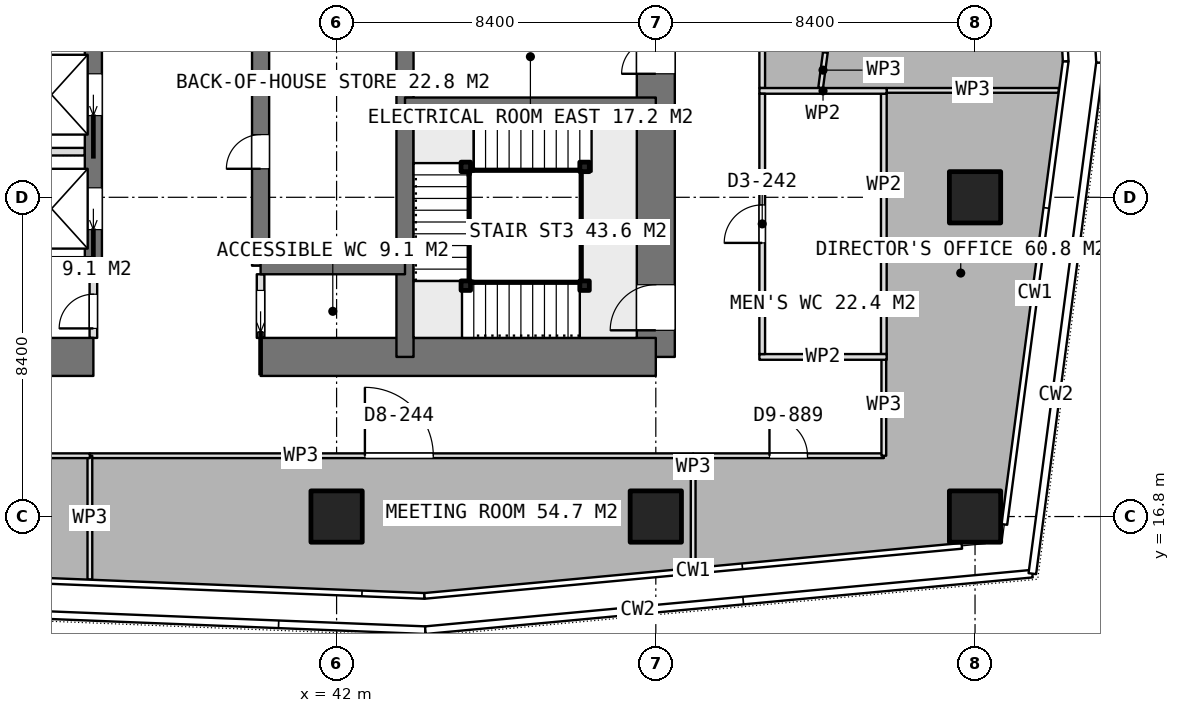
"""IFC4 building model, lengths in metres.
Left out: names, types, materials, properties, quantities, classifications, styles, units other than length and angle.
Written with IfcOpenShell. Run it as: python <this file> out.ifc"""

import sys

from ifc_helpers import new_model, si_unit, direction, frame, frame_2d, origin, origin_2d, place, context, subcontext, project, spatial, rectangle, extrude, element, fill, save


model = new_model("IFC4")
c1 = context("Model", 3, precision=1e-05, world=origin(), true_north=direction((0.0, 1.0)))
c2 = subcontext(c1, "Body", "Model", "MODEL_VIEW")
j1 = project(units=[si_unit("LENGTHUNIT", "METRE"), si_unit("PLANEANGLEUNIT", "RADIAN")], contexts=[c1])
p1 = place(None, origin())
s1 = spatial("IfcSite", under=j1, at=p1, CompositionType="ELEMENT")
p2 = place(p1, origin())
s2 = spatial("IfcBuilding", under=s1, at=p2, CompositionType="ELEMENT")
p3 = place(p2, frame((0.0, 0.0, 225.2)))
s3 = spatial("IfcBuildingStorey", under=s2, at=p3, CompositionType="ELEMENT", Elevation=225.2)
p4 = place(p3, frame((25.2, 21.0, 0.0), z_axis=(0.0, 0.0, 1.0), x_axis=(1.0, 0.0, 0.0)))
e1 = element("IfcWall", 1, at=p4, inside=s3, PredefinedType="SHEAR", context=c2, shape_type="SweptSolid", body=[
    extrude(rectangle(XDim=10.4, YDim=1.0, at=frame_2d((5.2, 0.0))), origin(), (0.0, 0.0, 1.0), 3.75),
])
p5 = place(p3, frame((40.0, 21.0, 0.0), z_axis=(0.0, 0.0, 1.0), x_axis=(1.0, 0.0, 0.0)))
e2 = element("IfcWall", 2, at=p5, inside=s3, PredefinedType="SHEAR", context=c2, shape_type="SweptSolid", body=[
    extrude(rectangle(XDim=10.4, YDim=1.0, at=frame_2d((5.2, 0.0))), origin(), (0.0, 0.0, 1.0), 3.75),
])
p6 = place(p3, frame((50.4, 21.0, 0.0), z_axis=(0.0, 0.0, 1.0), x_axis=(0.0, 1.0, 0.0)))
e3 = element("IfcWall", 3, at=p6, inside=s3, PredefinedType="SHEAR", context=c2, shape_type="SweptSolid", body=[
    extrude(rectangle(XDim=25.2, YDim=1.0, at=frame_2d((12.6, 0.0))), origin(), (0.0, 0.0, 1.0), 3.75),
])
p7 = place(p6, frame((16.2, 0.0, 0.0)))
e4 = element("IfcOpeningElement", 4, at=p7, cuts=e3, PredefinedType="OPENING", context=c2, shape_type="SweptSolid", body=[
    extrude(rectangle(XDim=1.2, YDim=2.1, at=frame_2d((0.6, 1.05))), frame((0.0, 0.51, 0.0), z_axis=(0.0, -1.0, 0.0), x_axis=(1.0, 0.0, 0.0)), (0.0, 0.0, 1.0), 1.02),
])
p8 = place(p6, frame((10.05, 0.0, 0.0)))
e5 = element("IfcOpeningElement", 5, at=p8, cuts=e3, PredefinedType="OPENING", context=c2, shape_type="SweptSolid", body=[
    extrude(rectangle(XDim=0.9, YDim=2.1, at=frame_2d((0.45, 1.05))), frame((0.0, 0.51, 0.0), z_axis=(0.0, -1.0, 0.0), x_axis=(1.0, 0.0, 0.0)), (0.0, 0.0, 1.0), 1.02),
])
p9 = place(p6, frame((7.45, 0.0, 0.0)))
e6 = element("IfcOpeningElement", 6, at=p9, cuts=e3, PredefinedType="OPENING", context=c2, shape_type="SweptSolid", body=[
    extrude(rectangle(XDim=0.9, YDim=2.1, at=frame_2d((0.45, 1.05))), frame((0.0, 0.51, 0.0), z_axis=(0.0, -1.0, 0.0), x_axis=(1.0, 0.0, 0.0)), (0.0, 0.0, 1.0), 1.02),
])
p10 = place(p6, frame((0.7, 0.0, 0.0)))
e7 = element("IfcOpeningElement", 7, at=p10, cuts=e3, PredefinedType="OPENING", context=c2, shape_type="SweptSolid", body=[
    extrude(rectangle(XDim=1.2, YDim=2.1, at=frame_2d((0.6, 1.05))), frame((0.0, 0.51, 0.0), z_axis=(0.0, -1.0, 0.0), x_axis=(1.0, 0.0, 0.0)), (0.0, 0.0, 1.0), 1.02),
])
p11 = place(p3, frame((43.8, 21.0, 0.0), z_axis=(0.0, 0.0, 1.0), x_axis=(0.0, 1.0, 0.0)))
e8 = element("IfcWall", 8, at=p11, inside=s3, PredefinedType="SHEAR", context=c2, shape_type="SweptSolid", body=[
    extrude(rectangle(XDim=25.2, YDim=0.45, at=frame_2d((12.6, 0.0))), origin(), (0.0, 0.0, 1.0), 3.75),
])
p12 = place(p3, frame((35.6, 23.4, 0.0), z_axis=(0.0, 0.0, 1.0), x_axis=(0.0, 1.0, 0.0)))
e9 = element("IfcWall", 9, at=p12, inside=s3, PredefinedType="SHEAR", context=c2, shape_type="SweptSolid", body=[
    extrude(rectangle(XDim=18.0, YDim=0.45, at=frame_2d((9.0, 0.0))), origin(), (0.0, 0.0, 1.0), 3.75),
])
p13 = place(p12, frame((0.95, 0.0, 0.0)))
e10 = element("IfcOpeningElement", 10, at=p13, cuts=e9, PredefinedType="OPENING", context=c2, shape_type="SweptSolid", body=[
    extrude(rectangle(XDim=1.1, YDim=2.1, at=frame_2d((0.55, 1.05))), frame((0.0, 0.235, 0.0), z_axis=(0.0, -1.0, 0.0), x_axis=(1.0, 0.0, 0.0)), (0.0, 0.0, 1.0), 0.47),
])
p14 = place(p12, frame((3.95, 0.0, 0.0)))
e11 = element("IfcOpeningElement", 11, at=p14, cuts=e9, PredefinedType="OPENING", context=c2, shape_type="SweptSolid", body=[
    extrude(rectangle(XDim=1.1, YDim=2.1, at=frame_2d((0.55, 1.05))), frame((0.0, 0.235, 0.0), z_axis=(0.0, -1.0, 0.0), x_axis=(1.0, 0.0, 0.0)), (0.0, 0.0, 1.0), 0.47),
])
p15 = place(p12, frame((6.95, 0.0, 0.0)))
e12 = element("IfcOpeningElement", 12, at=p15, cuts=e9, PredefinedType="OPENING", context=c2, shape_type="SweptSolid", body=[
    extrude(rectangle(XDim=1.1, YDim=2.1, at=frame_2d((0.55, 1.05))), frame((0.0, 0.235, 0.0), z_axis=(0.0, -1.0, 0.0), x_axis=(1.0, 0.0, 0.0)), (0.0, 0.0, 1.0), 0.47),
])
p16 = place(p12, frame((9.95, 0.0, 0.0)))
e13 = element("IfcOpeningElement", 13, at=p16, cuts=e9, PredefinedType="OPENING", context=c2, shape_type="SweptSolid", body=[
    extrude(rectangle(XDim=1.1, YDim=2.1, at=frame_2d((0.55, 1.05))), frame((0.0, 0.235, 0.0), z_axis=(0.0, -1.0, 0.0), x_axis=(1.0, 0.0, 0.0)), (0.0, 0.0, 1.0), 0.47),
])
p17 = place(p12, frame((12.95, 0.0, 0.0)))
e14 = element("IfcOpeningElement", 14, at=p17, cuts=e9, PredefinedType="OPENING", context=c2, shape_type="SweptSolid", body=[
    extrude(rectangle(XDim=1.1, YDim=2.1, at=frame_2d((0.55, 1.05))), frame((0.0, 0.235, 0.0), z_axis=(0.0, -1.0, 0.0), x_axis=(1.0, 0.0, 0.0)), (0.0, 0.0, 1.0), 0.47),
])
p18 = place(p12, frame((15.95, 0.0, 0.0)))
e15 = element("IfcOpeningElement", 15, at=p18, cuts=e9, PredefinedType="OPENING", context=c2, shape_type="SweptSolid", body=[
    extrude(rectangle(XDim=1.1, YDim=2.1, at=frame_2d((0.55, 1.05))), frame((0.0, 0.235, 0.0), z_axis=(0.0, -1.0, 0.0), x_axis=(1.0, 0.0, 0.0)), (0.0, 0.0, 1.0), 0.47),
])
p19 = place(p3, frame((40.0, 23.4, 0.0), z_axis=(0.0, 0.0, 1.0), x_axis=(0.0, 1.0, 0.0)))
e16 = element("IfcWall", 16, at=p19, inside=s3, PredefinedType="SHEAR", context=c2, shape_type="SweptSolid", body=[
    extrude(rectangle(XDim=18.0, YDim=0.45, at=frame_2d((9.0, 0.0))), origin(), (0.0, 0.0, 1.0), 3.75),
])
p20 = place(p19, frame((2.55, 0.0, 0.0)))
e17 = element("IfcOpeningElement", 17, at=p20, cuts=e16, PredefinedType="OPENING", context=c2, shape_type="SweptSolid", body=[
    extrude(rectangle(XDim=0.9, YDim=2.1, at=frame_2d((0.45, 1.05))), frame((0.0, 0.235, 0.0), z_axis=(0.0, -1.0, 0.0), x_axis=(1.0, 0.0, 0.0)), (0.0, 0.0, 1.0), 0.47),
])
p21 = place(p19, frame((8.55, 0.0, 0.0)))
e18 = element("IfcOpeningElement", 18, at=p21, cuts=e16, PredefinedType="OPENING", context=c2, shape_type="SweptSolid", body=[
    extrude(rectangle(XDim=0.9, YDim=2.1, at=frame_2d((0.45, 1.05))), frame((0.0, 0.235, 0.0), z_axis=(0.0, -1.0, 0.0), x_axis=(1.0, 0.0, 0.0)), (0.0, 0.0, 1.0), 0.47),
])
for number, where, z_axis, x_axis in (
    (19, (31.8, 23.4, 0.0), (0.0, 0.0, 1.0), (1.0, 0.0, 0.0)),
    (20, (40.0, 23.4, 0.0), (0.0, 0.0, 1.0), (1.0, 0.0, 0.0)),
):
    element("IfcWall", number, at=place(p3, frame(where, z_axis=z_axis, x_axis=x_axis)), inside=s3, PredefinedType="SHEAR", context=c2, shape_type="SweptSolid", body=[
        extrude(rectangle(XDim=3.8, YDim=0.45, at=frame_2d((1.9, 0.0))), origin(), (0.0, 0.0, 1.0), 3.75),
    ])
p22 = place(p3, frame((43.8, 27.6, 0.0), z_axis=(0.0, 0.0, 1.0), x_axis=(1.0, 0.0, 0.0)))
e21 = element("IfcWall", 21, at=p22, inside=s3, PredefinedType="SHEAR", context=c2, shape_type="SweptSolid", body=[
    extrude(rectangle(XDim=6.6, YDim=0.45, at=frame_2d((3.3, 0.0))), origin(), (0.0, 0.0, 1.0), 3.75),
])
for number, where, z_axis, x_axis in (
    (22, (42.0, 16.8, 0.0), (0.0, 0.0, 1.0), (1.0, 0.0, 0.0)),
    (23, (50.4, 16.8, 0.0), (0.0, 0.0, 1.0), (1.0, 0.0, 0.0)),
    (24, (58.8, 16.8, 0.0), (0.0, 0.0, 1.0), (1.0, 0.0, 0.0)),
    (25, (58.8, 25.2, 0.0), (0.0, 0.0, 1.0), (1.0, 0.0, 0.0)),
):
    element("IfcColumn", number, at=place(p3, frame(where, z_axis=z_axis, x_axis=x_axis)), inside=s3, PredefinedType="COLUMN", context=c2, shape_type="SweptSolid", body=[
        extrude(rectangle(XDim=1.35, YDim=1.35, at=origin_2d()), origin(), (0.0, 0.0, 1.0), 3.75),
    ])
p23 = place(p3, frame((32.025, 26.4, 0.0), z_axis=(0.0, 0.0, 1.0), x_axis=(1.0, 0.0, 0.0)))
e26 = element("IfcWall", 26, at=p23, inside=s3, PredefinedType="PARTITIONING", context=c2, shape_type="SweptSolid", body=[
    extrude(rectangle(XDim=3.35, YDim=0.2, at=frame_2d((1.675, 0.0))), origin(), (0.0, 0.0, 1.0), 3.5),
])
p24 = place(p3, frame((40.0, 21.5, 0.0), z_axis=(0.0, 0.0, 1.0), x_axis=(0.0, 1.0, 0.0)))
e27 = element("IfcWall", 27, at=p24, inside=s3, PredefinedType="PARTITIONING", context=c2, shape_type="SweptSolid", body=[
    extrude(rectangle(XDim=1.675, YDim=0.2, at=frame_2d((0.837, 0.0))), origin(), (0.0, 0.0, 1.0), 3.5),
])
p25 = place(p24, frame((0.15, 0.0, 0.0)))
e28 = element("IfcOpeningElement", 28, at=p25, cuts=e27, PredefinedType="OPENING", context=c2, shape_type="SweptSolid", body=[
    extrude(rectangle(XDim=1.1, YDim=2.1, at=frame_2d((0.55, 1.05))), frame((0.0, 0.11, 0.0), z_axis=(0.0, -1.0, 0.0), x_axis=(1.0, 0.0, 0.0)), (0.0, 0.0, 1.0), 0.22),
])
p26 = place(p3, frame((35.6, 21.5, 0.0), z_axis=(0.0, 0.0, 1.0), x_axis=(0.0, 1.0, 0.0)))
e29 = element("IfcWall", 29, at=p26, inside=s3, PredefinedType="PARTITIONING", context=c2, shape_type="SweptSolid", body=[
    extrude(rectangle(XDim=1.675, YDim=0.2, at=frame_2d((0.837, 0.0))), origin(), (0.0, 0.0, 1.0), 3.5),
])
p27 = place(p26, frame((0.25, 0.0, 0.0)))
e30 = element("IfcOpeningElement", 30, at=p27, cuts=e29, PredefinedType="OPENING", context=c2, shape_type="SweptSolid", body=[
    extrude(rectangle(XDim=0.9, YDim=2.1, at=frame_2d((0.45, 1.05))), frame((0.0, 0.11, 0.0), z_axis=(0.0, -1.0, 0.0), x_axis=(1.0, 0.0, 0.0)), (0.0, 0.0, 1.0), 0.22),
])
for number, where, z_axis, x_axis in (
    (31, (53.125, 21.0, 0.0), (0.0, 0.0, 1.0), (1.0, 0.0, 0.0)),
    (32, (53.125, 28.0, 0.0), (0.0, 0.0, 1.0), (1.0, 0.0, 0.0)),
):
    element("IfcWall", number, at=place(p3, frame(where, z_axis=z_axis, x_axis=x_axis)), inside=s3, PredefinedType="PARTITIONING", context=c2, shape_type="SweptSolid", body=[
        extrude(rectangle(XDim=3.35, YDim=0.15, at=frame_2d((1.675, 0.0))), origin(), (0.0, 0.0, 1.0), 3.5),
    ])
p28 = place(p3, frame((53.2, 21.075, 0.0), z_axis=(0.0, 0.0, 1.0), x_axis=(0.0, 1.0, 0.0)))
e33 = element("IfcWall", 33, at=p28, inside=s3, PredefinedType="PARTITIONING", context=c2, shape_type="SweptSolid", body=[
    extrude(rectangle(XDim=6.85, YDim=0.15, at=frame_2d((3.425, 0.0))), origin(), (0.0, 0.0, 1.0), 3.5),
])
p29 = place(p28, frame((2.925, 0.0, 0.0)))
e34 = element("IfcOpeningElement", 34, at=p29, cuts=e33, PredefinedType="OPENING", context=c2, shape_type="SweptSolid", body=[
    extrude(rectangle(XDim=1.0, YDim=2.1, at=frame_2d((0.5, 1.05))), frame((0.0, 0.085, 0.0), z_axis=(0.0, -1.0, 0.0), x_axis=(1.0, 0.0, 0.0)), (0.0, 0.0, 1.0), 0.17),
])
p30 = place(p3, frame((56.4, 21.075, 0.0), z_axis=(0.0, 0.0, 1.0), x_axis=(0.0, 1.0, 0.0)))
e35 = element("IfcWall", 35, at=p30, inside=s3, PredefinedType="PARTITIONING", context=c2, shape_type="SweptSolid", body=[
    extrude(rectangle(XDim=6.85, YDim=0.15, at=frame_2d((3.425, 0.0))), origin(), (0.0, 0.0, 1.0), 3.5),
])
p31 = place(p3, frame((35.508, 18.4, 0.0), z_axis=(0.0, 0.0, 1.0), x_axis=(1.0, 0.0, 0.0)))
e36 = element("IfcWall", 36, at=p31, inside=s3, PredefinedType="PARTITIONING", context=c2, shape_type="SweptSolid", body=[
    extrude(rectangle(XDim=15.875, YDim=0.125, at=frame_2d((7.938, 0.0))), origin(), (0.0, 0.0, 1.0), 3.5),
])
p32 = place(p31, frame((7.237, 0.0, 0.0)))
e37 = element("IfcOpeningElement", 37, at=p32, cuts=e36, PredefinedType="OPENING", context=c2, shape_type="SweptSolid", body=[
    extrude(rectangle(XDim=1.8, YDim=2.1, at=frame_2d((0.9, 1.05))), frame((0.0, 0.073, 0.0), z_axis=(0.0, -1.0, 0.0), x_axis=(1.0, 0.0, 0.0)), (0.0, 0.0, 1.0), 0.145),
])
p33 = place(p3, frame((51.383, 18.4, 0.0), z_axis=(0.0, 0.0, 1.0), x_axis=(0.0, -1.0, 0.0)))
e38 = element("IfcWall", 38, at=p33, inside=s3, PredefinedType="PARTITIONING", context=c2, shape_type="SweptSolid", body=[
    extrude(rectangle(XDim=2.949, YDim=0.125, at=frame_2d((1.475, 0.0))), origin(), (0.0, 0.0, 1.0), 3.5),
])
p34 = place(p3, frame((35.508, 15.143, 0.0), z_axis=(0.0, 0.0, 1.0), x_axis=(0.0, 1.0, 0.0)))
e39 = element("IfcWall", 39, at=p34, inside=s3, PredefinedType="PARTITIONING", context=c2, shape_type="SweptSolid", body=[
    extrude(rectangle(XDim=3.257, YDim=0.125, at=frame_2d((1.628, 0.0))), origin(), (0.0, 0.0, 1.0), 3.5),
])
p35 = place(p3, frame((51.383, 18.4, 0.0), z_axis=(0.0, 0.0, 1.0), x_axis=(1.0, 0.0, 0.0)))
e40 = element("IfcWall", 40, at=p35, inside=s3, PredefinedType="PARTITIONING", context=c2, shape_type="SweptSolid", body=[
    extrude(rectangle(XDim=5.017, YDim=0.125, at=frame_2d((2.508, 0.0))), origin(), (0.0, 0.0, 1.0), 3.5),
])
p36 = place(p35, frame((2.008, 0.0, 0.0)))
e41 = element("IfcOpeningElement", 41, at=p36, cuts=e40, PredefinedType="OPENING", context=c2, shape_type="SweptSolid", body=[
    extrude(rectangle(XDim=1.0, YDim=2.1, at=frame_2d((0.5, 1.05))), frame((0.0, 0.073, 0.0), z_axis=(0.0, -1.0, 0.0), x_axis=(1.0, 0.0, 0.0)), (0.0, 0.0, 1.0), 0.145),
])
p37 = place(p3, frame((56.4, 18.4, 0.0), z_axis=(0.0, 0.0, 1.0), x_axis=(0.0, 1.0, 0.0)))
e42 = element("IfcWall", 42, at=p37, inside=s3, PredefinedType="PARTITIONING", context=c2, shape_type="SweptSolid", body=[
    extrude(rectangle(XDim=2.675, YDim=0.125, at=frame_2d((1.337, 0.0))), origin(), (0.0, 0.0, 1.0), 3.5),
])
p38 = place(p3, frame((56.476, 28.013, 0.0), z_axis=(0.0, 0.0, 1.0), x_axis=(1.0, 0.0, 0.0)))
e43 = element("IfcWall", 43, at=p38, inside=s3, PredefinedType="PARTITIONING", context=c2, shape_type="SweptSolid", body=[
    extrude(rectangle(XDim=4.528, YDim=0.125, at=frame_2d((2.264, 0.0))), origin(), (0.0, 0.0, 1.0), 3.5),
])
p39 = place(p3, frame((54.737, 28.075, 0.0), z_axis=(0.0, 0.0, 1.0), x_axis=(0.131524288557, 0.991312948326, 0.0)))
e44 = element("IfcWall", 44, at=p39, inside=s3, PredefinedType="PARTITIONING", context=c2, shape_type="SweptSolid", body=[
    extrude(rectangle(XDim=0.95, YDim=0.125, at=frame_2d((0.475, 0.0))), origin(), (0.0, 0.0, 1.0), 3.5),
])
p40 = place(p3, frame((26.704, 18.4, 0.0), z_axis=(0.0, 0.0, 1.0), x_axis=(1.0, 0.0, 0.0)))
e45 = element("IfcWall", 45, at=p40, inside=s3, PredefinedType="PARTITIONING", context=c2, shape_type="SweptSolid", body=[
    extrude(rectangle(XDim=8.803, YDim=0.125, at=frame_2d((4.401, 0.0))), origin(), (0.0, 0.0, 1.0), 3.5),
])
p41 = place(p40, frame((3.901, 0.0, 0.0)))
e46 = element("IfcOpeningElement", 46, at=p41, cuts=e45, PredefinedType="OPENING", context=c2, shape_type="SweptSolid", body=[
    extrude(rectangle(XDim=1.0, YDim=2.1, at=frame_2d((0.5, 1.05))), frame((0.0, 0.073, 0.0), z_axis=(0.0, -1.0, 0.0), x_axis=(1.0, 0.0, 0.0)), (0.0, 0.0, 1.0), 0.145),
])
p42 = place(p3, frame((53.2, 28.075, 0.0), z_axis=(0.0, 0.0, 1.0), x_axis=(0.0, 1.0, 0.0)))
e47 = element("IfcWall", 47, at=p42, inside=s3, PredefinedType="PARTITIONING", context=c2, shape_type="SweptSolid", body=[
    extrude(rectangle(XDim=24.5, YDim=0.15, at=frame_2d((12.25, 0.0))), origin(), (0.0, 0.0, 1.0), 3.5),
])
p43 = place(p42, frame((11.713, 0.0, 0.0)))
e48 = element("IfcOpeningElement", 48, at=p43, cuts=e47, PredefinedType="OPENING", context=c2, shape_type="SweptSolid", body=[
    extrude(rectangle(XDim=1.0, YDim=2.1, at=frame_2d((0.5, 1.05))), frame((0.0, 0.085, 0.0), z_axis=(0.0, -1.0, 0.0), x_axis=(1.0, 0.0, 0.0)), (0.0, 0.0, 1.0), 0.17),
])
for number, where, z_axis, x_axis in (
    (49, (48.525, 22.875, 0.0), (0.0, 0.0, 1.0), (1.0, 0.0, 0.0)),
    (50, (45.4, 22.875, 0.0), (0.0, 0.0, 1.0), (1.0, 0.0, 0.0)),
    (51, (45.4, 26.0, 0.0), (0.0, 0.0, 1.0), (1.0, 0.0, 0.0)),
    (52, (48.525, 26.0, 0.0), (0.0, 0.0, 1.0), (1.0, 0.0, 0.0)),
):
    element("IfcColumn", number, at=place(p3, frame(where, z_axis=z_axis, x_axis=x_axis)), inside=s3, PredefinedType="COLUMN", context=c2, shape_type="SweptSolid", body=[
        extrude(rectangle(XDim=0.25, YDim=0.25, at=origin_2d()), origin(), (0.0, 0.0, 1.0), 3.75),
    ])
p44 = place(p9, origin())
e53 = element("IfcDoor", 53, at=p44, inside=s3, OperationType="SINGLE_SWING_LEFT", PredefinedType="DOOR", context=c2, shape_type="SweptSolid", body=[
    extrude(rectangle(XDim=0.9, YDim=2.1, at=frame_2d((0.45, 1.05))), frame((0.0, 0.025, 0.0), z_axis=(0.0, -1.0, 0.0), x_axis=(1.0, 0.0, 0.0)), (0.0, 0.0, 1.0), 0.05),
])
fill(e6, e53)
p45 = place(p25, origin())
e54 = element("IfcDoor", 54, at=p45, inside=s3, OperationType="SLIDING_TO_LEFT", PredefinedType="DOOR", context=c2, shape_type="SweptSolid", body=[
    extrude(rectangle(XDim=1.1, YDim=2.1, at=frame_2d((0.55, 1.05))), frame((0.0, 0.025, 0.0), z_axis=(0.0, -1.0, 0.0), x_axis=(1.0, 0.0, 0.0)), (0.0, 0.0, 1.0), 0.05),
])
fill(e28, e54)
p46 = place(p27, origin())
e55 = element("IfcDoor", 55, at=p46, inside=s3, OperationType="SINGLE_SWING_LEFT", PredefinedType="DOOR", context=c2, shape_type="SweptSolid", body=[
    extrude(rectangle(XDim=0.9, YDim=2.1, at=frame_2d((0.45, 1.05))), frame((0.0, 0.025, 0.0), z_axis=(0.0, -1.0, 0.0), x_axis=(1.0, 0.0, 0.0)), (0.0, 0.0, 1.0), 0.05),
])
fill(e30, e55)
p47 = place(p20, origin())
e56 = element("IfcDoor", 56, at=p47, inside=s3, OperationType="SINGLE_SWING_LEFT", PredefinedType="DOOR", context=c2, shape_type="SweptSolid", body=[
    extrude(rectangle(XDim=0.9, YDim=2.1, at=frame_2d((0.45, 1.05))), frame((0.0, 0.025, 0.0), z_axis=(0.0, -1.0, 0.0), x_axis=(1.0, 0.0, 0.0)), (0.0, 0.0, 1.0), 0.05),
])
fill(e17, e56)
p48 = place(p13, origin())
e57 = element("IfcDoor", 57, at=p48, inside=s3, OperationType="SLIDING_TO_LEFT", PredefinedType="USERDEFINED", context=c2, shape_type="SweptSolid", body=[
    extrude(rectangle(XDim=1.1, YDim=2.1, at=frame_2d((0.55, 1.05))), frame((0.0, 0.025, 0.0), z_axis=(0.0, -1.0, 0.0), x_axis=(1.0, 0.0, 0.0)), (0.0, 0.0, 1.0), 0.05),
])
fill(e10, e57)
p49 = place(p14, origin())
e58 = element("IfcDoor", 58, at=p49, inside=s3, OperationType="SLIDING_TO_LEFT", PredefinedType="USERDEFINED", context=c2, shape_type="SweptSolid", body=[
    extrude(rectangle(XDim=1.1, YDim=2.1, at=frame_2d((0.55, 1.05))), frame((0.0, 0.025, 0.0), z_axis=(0.0, -1.0, 0.0), x_axis=(1.0, 0.0, 0.0)), (0.0, 0.0, 1.0), 0.05),
])
fill(e11, e58)
p50 = place(p29, origin())
e59 = element("IfcDoor", 59, at=p50, inside=s3, OperationType="SINGLE_SWING_LEFT", PredefinedType="DOOR", context=c2, shape_type="SweptSolid", body=[
    extrude(rectangle(XDim=1.0, YDim=2.1, at=frame_2d((0.5, 1.05))), frame((0.0, 0.025, 0.0), z_axis=(0.0, -1.0, 0.0), x_axis=(1.0, 0.0, 0.0)), (0.0, 0.0, 1.0), 0.05),
])
fill(e34, e59)
p51 = place(p32, origin())
e60 = element("IfcDoor", 60, at=p51, inside=s3, OperationType="DOUBLE_DOOR_SINGLE_SWING", PredefinedType="DOOR", context=c2, shape_type="SweptSolid", body=[
    extrude(rectangle(XDim=1.8, YDim=2.1, at=frame_2d((0.9, 1.05))), frame((0.0, 0.025, 0.0), z_axis=(0.0, -1.0, 0.0), x_axis=(1.0, 0.0, 0.0)), (0.0, 0.0, 1.0), 0.05),
])
fill(e37, e60)
p52 = place(p36, origin())
e61 = element("IfcDoor", 61, at=p52, inside=s3, OperationType="SINGLE_SWING_LEFT", PredefinedType="DOOR", context=c2, shape_type="SweptSolid", body=[
    extrude(rectangle(XDim=1.0, YDim=2.1, at=frame_2d((0.5, 1.05))), frame((0.0, 0.025, 0.0), z_axis=(0.0, -1.0, 0.0), x_axis=(1.0, 0.0, 0.0)), (0.0, 0.0, 1.0), 0.05),
])
fill(e41, e61)
p53 = place(p10, origin())
e62 = element("IfcDoor", 62, at=p53, inside=s3, OperationType="SINGLE_SWING_RIGHT", PredefinedType="DOOR", context=c2, shape_type="SweptSolid", body=[
    extrude(rectangle(XDim=1.2, YDim=2.1, at=frame_2d((0.6, 1.05))), frame((0.0, 0.025, 0.0), z_axis=(0.0, -1.0, 0.0), x_axis=(1.0, 0.0, 0.0)), (0.0, 0.0, 1.0), 0.05),
])
fill(e7, e62)
save(model, sys.argv[1])
